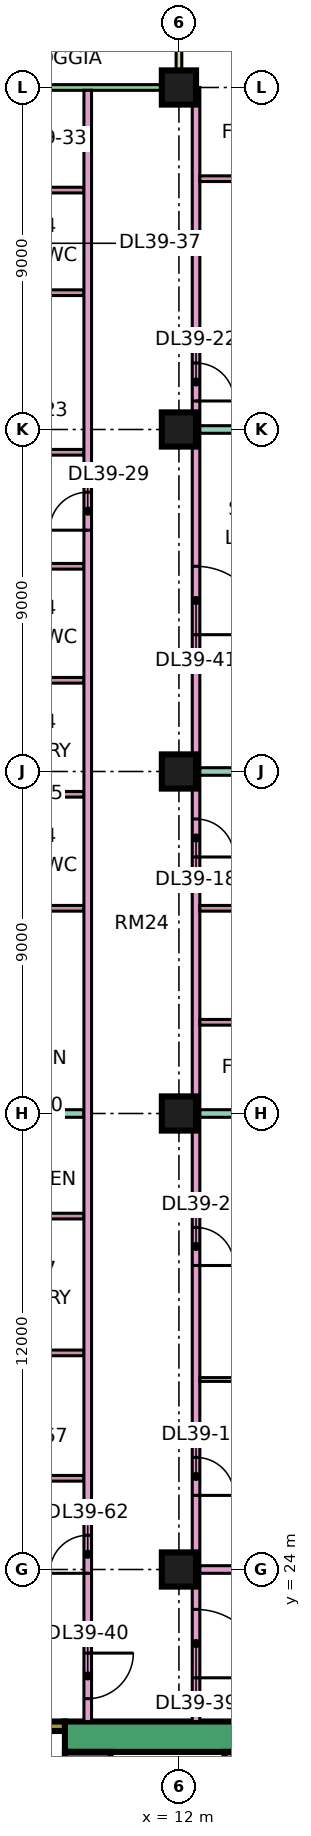
"""IFC4 building model, lengths in metres.
Left out: names, types, materials, properties, quantities, classifications, styles, units other than length and angle.
Written with IfcOpenShell. Run it as: python <this file> out.ifc"""

import sys

from ifc_helpers import new_model, si_unit, direction, frame, frame_2d, origin, origin_2d, place, context, subcontext, project, spatial, rectangle, extrude, element, fill, save


model = new_model("IFC4")
c1 = context("Model", 3, precision=1e-05, world=origin(), true_north=direction((0.0, 1.0)))
c2 = subcontext(c1, "Body", "Model", "MODEL_VIEW")
j1 = project(units=[si_unit("LENGTHUNIT", "METRE"), si_unit("PLANEANGLEUNIT", "RADIAN")], contexts=[c1])
p1 = place(None, origin())
s1 = spatial("IfcSite", under=j1, at=p1, CompositionType="ELEMENT")
p2 = place(p1, origin())
s2 = spatial("IfcBuilding", under=s1, at=p2, CompositionType="ELEMENT")
p3 = place(p2, frame((0.0, 0.0, 172.4)))
s3 = spatial("IfcBuildingStorey", under=s2, at=p3, CompositionType="ELEMENT", Elevation=172.4)
for number, where, z_axis, x_axis in (
    (1, (12.0, 24.0, 0.0), (0.0, 0.0, 1.0), (1.0, 0.0, 0.0)),
    (2, (12.0, 36.0, 0.0), (0.0, 0.0, 1.0), (1.0, 0.0, 0.0)),
    (3, (12.0, 45.0, 0.0), (0.0, 0.0, 1.0), (1.0, 0.0, 0.0)),
    (4, (12.0, 54.0, 0.0), (0.0, 0.0, 1.0), (1.0, 0.0, 0.0)),
    (5, (12.0, 63.0, 0.0), (0.0, 0.0, 1.0), (1.0, 0.0, 0.0)),
):
    element("IfcColumn", number, at=place(p3, frame(where, z_axis=z_axis, x_axis=x_axis)), inside=s3, PredefinedType="COLUMN", context=c2, shape_type="SweptSolid", body=[
        extrude(rectangle(XDim=0.9, YDim=0.9, at=origin_2d()), origin(), (0.0, 0.0, 1.0), 3.75),
    ])
p4 = place(p3, frame((9.0, 19.6, 0.0), z_axis=(0.0, 0.0, 1.0), x_axis=(1.0, 0.0, 0.0)))
e6 = element("IfcWall", 6, at=p4, inside=s3, PredefinedType="SHEAR", context=c2, shape_type="SweptSolid", body=[
    extrude(rectangle(XDim=25.0, YDim=0.8, at=frame_2d((12.5, 0.0))), origin(), (0.0, 0.0, 1.0), 3.75),
])
p5 = place(p4, frame((19.1, 0.0, 0.0)))
e7 = element("IfcOpeningElement", 7, at=p5, cuts=e6, PredefinedType="OPENING", context=c2, shape_type="SweptSolid", body=[
    extrude(rectangle(XDim=1.8, YDim=2.4, at=frame_2d((0.9, 1.2))), frame((0.0, 0.41, 0.0), z_axis=(0.0, -1.0, 0.0), x_axis=(1.0, 0.0, 0.0)), (0.0, 0.0, 1.0), 0.82),
])
p6 = place(p3, frame((9.6, 7.8, 0.0), z_axis=(0.0, 0.0, 1.0), x_axis=(0.0, 1.0, 0.0)))
e8 = element("IfcWall", 8, at=p6, inside=s3, PredefinedType="SHEAR", context=c2, shape_type="SweptSolid", body=[
    extrude(rectangle(XDim=11.4, YDim=1.2, at=frame_2d((5.7, 0.0))), origin(), (0.0, 0.0, 1.0), 3.75),
])
p7 = place(p6, frame((4.075, 0.0, 0.0)))
e9 = element("IfcOpeningElement", 9, at=p7, cuts=e8, PredefinedType="OPENING", context=c2, shape_type="SweptSolid", body=[
    extrude(rectangle(XDim=1.1, YDim=2.2, at=frame_2d((0.55, 1.1))), frame((0.0, 0.61, 0.0), z_axis=(0.0, -1.0, 0.0), x_axis=(1.0, 0.0, 0.0)), (0.0, 0.0, 1.0), 1.22),
])
p8 = place(p6, frame((6.575, 0.0, 0.0)))
e10 = element("IfcOpeningElement", 10, at=p8, cuts=e8, PredefinedType="OPENING", context=c2, shape_type="SweptSolid", body=[
    extrude(rectangle(XDim=1.1, YDim=2.2, at=frame_2d((0.55, 1.1))), frame((0.0, 0.61, 0.0), z_axis=(0.0, -1.0, 0.0), x_axis=(1.0, 0.0, 0.0)), (0.0, 0.0, 1.0), 1.22),
])
p9 = place(p6, frame((9.4, 0.0, 0.0)))
e11 = element("IfcOpeningElement", 11, at=p9, cuts=e8, PredefinedType="OPENING", context=c2, shape_type="SweptSolid", body=[
    extrude(rectangle(XDim=1.1, YDim=2.2, at=frame_2d((0.55, 1.1))), frame((0.0, 0.61, 0.0), z_axis=(0.0, -1.0, 0.0), x_axis=(1.0, 0.0, 0.0)), (0.0, 0.0, 1.0), 1.22),
])
p10 = place(p6, frame((1.75, 0.0, 0.0)))
e12 = element("IfcOpeningElement", 12, at=p10, cuts=e8, PredefinedType="OPENING", context=c2, shape_type="SweptSolid", body=[
    extrude(rectangle(XDim=0.9, YDim=2.1, at=frame_2d((0.45, 1.05))), frame((0.0, 0.61, 0.0), z_axis=(0.0, -1.0, 0.0), x_axis=(1.0, 0.0, 0.0)), (0.0, 0.0, 1.0), 1.22),
])
p11 = place(p3, frame((13.325, 7.8, 0.0), z_axis=(0.0, 0.0, 1.0), x_axis=(0.0, 1.0, 0.0)))
e13 = element("IfcWall", 13, at=p11, inside=s3, PredefinedType="SHEAR", context=c2, shape_type="SweptSolid", body=[
    extrude(rectangle(XDim=11.4, YDim=0.25, at=frame_2d((5.7, 0.0))), origin(), (0.0, 0.0, 1.0), 3.75),
])
p12 = place(p3, frame((2.1, 19.875, 0.0), z_axis=(0.0, 0.0, 1.0), x_axis=(1.0, 0.0, 0.0)))
e14 = element("IfcWall", 14, at=p12, inside=s3, PredefinedType="SHEAR", context=c2, shape_type="SweptSolid", body=[
    extrude(rectangle(XDim=6.9, YDim=0.25, at=frame_2d((3.45, 0.0))), origin(), (0.0, 0.0, 1.0), 3.75),
])
p13 = place(p12, frame((1.175, 0.0, 0.0)))
e15 = element("IfcOpeningElement", 15, at=p13, cuts=e14, PredefinedType="OPENING", context=c2, shape_type="SweptSolid", body=[
    extrude(rectangle(XDim=1.1, YDim=2.2, at=frame_2d((0.55, 1.1))), frame((0.0, 0.135, 0.0), z_axis=(0.0, -1.0, 0.0), x_axis=(1.0, 0.0, 0.0)), (0.0, 0.0, 1.0), 0.27),
])
p14 = place(p12, frame((4.6, 0.0, 0.0)))
e16 = element("IfcOpeningElement", 16, at=p14, cuts=e14, PredefinedType="OPENING", context=c2, shape_type="SweptSolid", body=[
    extrude(rectangle(XDim=1.2, YDim=2.2, at=frame_2d((0.6, 1.1))), frame((0.0, 0.135, 0.0), z_axis=(0.0, -1.0, 0.0), x_axis=(1.0, 0.0, 0.0)), (0.0, 0.0, 1.0), 0.27),
])
p15 = place(p3, frame((11.925, 63.0, 0.0), z_axis=(0.0, 0.0, 1.0), x_axis=(-1.0, 0.0, 0.0)))
e17 = element("IfcWall", 17, at=p15, inside=s3, PredefinedType="SOLIDWALL", context=c2, shape_type="SweptSolid", body=[
    extrude(rectangle(XDim=10.35, YDim=0.15, at=frame_2d((5.175, 0.0))), origin(), (0.0, 0.0, 1.0), 3.35),
])
p16 = place(p15, frame((7.688, 0.0, 0.0)))
e18 = element("IfcOpeningElement", 18, at=p16, cuts=e17, PredefinedType="OPENING", context=c2, shape_type="SweptSolid", body=[
    extrude(rectangle(XDim=1.8, YDim=2.4, at=frame_2d((0.9, 1.2))), frame((0.0, 0.085, 0.0), z_axis=(0.0, -1.0, 0.0), x_axis=(1.0, 0.0, 0.0)), (0.0, 0.0, 1.0), 0.17),
])
p17 = place(p3, frame((12.0, 64.5, 0.0), z_axis=(0.0, 0.0, 1.0), x_axis=(0.0, -1.0, 0.0)))
e19 = element("IfcWall", 19, at=p17, inside=s3, PredefinedType="SOLIDWALL", context=c2, shape_type="SweptSolid", body=[
    extrude(rectangle(XDim=1.5, YDim=0.15, at=frame_2d((0.75, 0.0))), origin(), (0.0, 0.0, 1.0), 3.35),
])
p18 = place(p3, frame((-1.35, 22.4, 0.0), z_axis=(0.0, 0.0, 1.0), x_axis=(1.0, 0.0, 0.0)))
e20 = element("IfcWall", 20, at=p18, inside=s3, PredefinedType="PARTITIONING", context=c2, shape_type="SweptSolid", body=[
    extrude(rectangle(XDim=10.85, YDim=0.2, at=frame_2d((5.425, 0.0))), origin(), (0.0, 0.0, 1.0), 3.35),
])
p19 = place(p3, frame((0.0, 36.0, 0.0), z_axis=(0.0, 0.0, 1.0), x_axis=(1.0, 0.0, 0.0)))
e21 = element("IfcWall", 21, at=p19, inside=s3, PredefinedType="PARTITIONING", context=c2, shape_type="SweptSolid", body=[
    extrude(rectangle(XDim=9.5, YDim=0.2, at=frame_2d((4.75, 0.0))), origin(), (0.0, 0.0, 1.0), 3.35),
])
p20 = place(p3, frame((6.375, 26.4, 0.0), z_axis=(0.0, 0.0, 1.0), x_axis=(1.0, 0.0, 0.0)))
e22 = element("IfcWall", 22, at=p20, inside=s3, PredefinedType="PARTITIONING", context=c2, shape_type="SweptSolid", body=[
    extrude(rectangle(XDim=3.125, YDim=0.15, at=frame_2d((1.562, 0.0))), origin(), (0.0, 0.0, 1.0), 3.35),
])
p21 = place(p20, frame((1.225, 0.0, 0.0)))
e23 = element("IfcOpeningElement", 23, at=p21, cuts=e22, PredefinedType="OPENING", context=c2, shape_type="SweptSolid", body=[
    extrude(rectangle(XDim=0.8, YDim=2.1, at=frame_2d((0.4, 1.05))), frame((0.0, 0.085, 0.0), z_axis=(0.0, -1.0, 0.0), x_axis=(1.0, 0.0, 0.0)), (0.0, 0.0, 1.0), 0.17),
])
for number, where, z_axis, x_axis in (
    (24, (6.375, 29.7, 0.0), (0.0, 0.0, 1.0), (1.0, 0.0, 0.0)),
    (25, (6.375, 33.3, 0.0), (0.0, 0.0, 1.0), (1.0, 0.0, 0.0)),
    (26, (6.375, 41.4, 0.0), (0.0, 0.0, 1.0), (1.0, 0.0, 0.0)),
    (27, (6.375, 44.4, 0.0), (0.0, 0.0, 1.0), (1.0, 0.0, 0.0)),
    (28, (6.375, 47.4, 0.0), (0.0, 0.0, 1.0), (1.0, 0.0, 0.0)),
    (29, (6.375, 50.4, 0.0), (0.0, 0.0, 1.0), (1.0, 0.0, 0.0)),
):
    element("IfcWall", number, at=place(p3, frame(where, z_axis=z_axis, x_axis=x_axis)), inside=s3, PredefinedType="PARTITIONING", context=c2, shape_type="SweptSolid", body=[
        extrude(rectangle(XDim=3.125, YDim=0.15, at=frame_2d((1.562, 0.0))), origin(), (0.0, 0.0, 1.0), 3.35),
    ])
p22 = place(p3, frame((6.375, 53.4, 0.0), z_axis=(0.0, 0.0, 1.0), x_axis=(1.0, 0.0, 0.0)))
e30 = element("IfcWall", 30, at=p22, inside=s3, PredefinedType="PARTITIONING", context=c2, shape_type="SweptSolid", body=[
    extrude(rectangle(XDim=3.125, YDim=0.15, at=frame_2d((1.562, 0.0))), origin(), (0.0, 0.0, 1.0), 3.35),
])
p23 = place(p22, frame((1.225, 0.0, 0.0)))
e31 = element("IfcOpeningElement", 31, at=p23, cuts=e30, PredefinedType="OPENING", context=c2, shape_type="SweptSolid", body=[
    extrude(rectangle(XDim=0.8, YDim=2.1, at=frame_2d((0.4, 1.05))), frame((0.0, 0.085, 0.0), z_axis=(0.0, -1.0, 0.0), x_axis=(1.0, 0.0, 0.0)), (0.0, 0.0, 1.0), 0.17),
])
for number, where, z_axis, x_axis in (
    (32, (6.375, 57.6, 0.0), (0.0, 0.0, 1.0), (1.0, 0.0, 0.0)),
    (33, (6.375, 60.3, 0.0), (0.0, 0.0, 1.0), (1.0, 0.0, 0.0)),
):
    element("IfcWall", number, at=place(p3, frame(where, z_axis=z_axis, x_axis=x_axis)), inside=s3, PredefinedType="PARTITIONING", context=c2, shape_type="SweptSolid", body=[
        extrude(rectangle(XDim=3.125, YDim=0.15, at=frame_2d((1.562, 0.0))), origin(), (0.0, 0.0, 1.0), 3.35),
    ])
p24 = place(p3, frame((9.6, 20.0, 0.0), z_axis=(0.0, 0.0, 1.0), x_axis=(0.0, 1.0, 0.0)))
e34 = element("IfcWall", 34, at=p24, inside=s3, PredefinedType="PARTITIONING", context=c2, shape_type="SweptSolid", body=[
    extrude(rectangle(XDim=42.926, YDim=0.2, at=frame_2d((21.463, 0.0))), origin(), (0.0, 0.0, 1.0), 3.35),
])
p25 = place(p24, frame((31.35, 0.0, 0.0)))
e35 = element("IfcOpeningElement", 35, at=p25, cuts=e34, PredefinedType="OPENING", context=c2, shape_type="SweptSolid", body=[
    extrude(rectangle(XDim=1.0, YDim=2.1, at=frame_2d((0.5, 1.05))), frame((0.0, 0.11, 0.0), z_axis=(0.0, -1.0, 0.0), x_axis=(1.0, 0.0, 0.0)), (0.0, 0.0, 1.0), 0.22),
])
p26 = place(p24, frame((0.6, 0.0, 0.0)))
e36 = element("IfcOpeningElement", 36, at=p26, cuts=e34, PredefinedType="OPENING", context=c2, shape_type="SweptSolid", body=[
    extrude(rectangle(XDim=1.2, YDim=2.1, at=frame_2d((0.6, 1.05))), frame((0.0, 0.11, 0.0), z_axis=(0.0, -1.0, 0.0), x_axis=(1.0, 0.0, 0.0)), (0.0, 0.0, 1.0), 0.22),
])
p27 = place(p24, frame((3.9, 0.0, 0.0)))
e37 = element("IfcOpeningElement", 37, at=p27, cuts=e34, PredefinedType="OPENING", context=c2, shape_type="SweptSolid", body=[
    extrude(rectangle(XDim=1.0, YDim=2.1, at=frame_2d((0.5, 1.05))), frame((0.0, 0.11, 0.0), z_axis=(0.0, -1.0, 0.0), x_axis=(1.0, 0.0, 0.0)), (0.0, 0.0, 1.0), 0.22),
])
p28 = place(p3, frame((12.45, 20.0, 0.0), z_axis=(0.0, 0.0, 1.0), x_axis=(0.0, 1.0, 0.0)))
e38 = element("IfcWall", 38, at=p28, inside=s3, PredefinedType="PARTITIONING", context=c2, shape_type="SweptSolid", body=[
    extrude(rectangle(XDim=43.0, YDim=0.2, at=frame_2d((21.5, 0.0))), origin(), (0.0, 0.0, 1.0), 3.35),
])
p29 = place(p28, frame((5.95, 0.0, 0.0)))
e39 = element("IfcOpeningElement", 39, at=p29, cuts=e38, PredefinedType="OPENING", context=c2, shape_type="SweptSolid", body=[
    extrude(rectangle(XDim=1.0, YDim=2.1, at=frame_2d((0.5, 1.05))), frame((0.0, 0.11, 0.0), z_axis=(0.0, -1.0, 0.0), x_axis=(1.0, 0.0, 0.0)), (0.0, 0.0, 1.0), 0.22),
])
p30 = place(p28, frame((12.0, 0.0, 0.0)))
e40 = element("IfcOpeningElement", 40, at=p30, cuts=e38, PredefinedType="OPENING", context=c2, shape_type="SweptSolid", body=[
    extrude(rectangle(XDim=1.0, YDim=2.1, at=frame_2d((0.5, 1.05))), frame((0.0, 0.11, 0.0), z_axis=(0.0, -1.0, 0.0), x_axis=(1.0, 0.0, 0.0)), (0.0, 0.0, 1.0), 0.22),
])
p31 = place(p28, frame((22.75, 0.0, 0.0)))
e41 = element("IfcOpeningElement", 41, at=p31, cuts=e38, PredefinedType="OPENING", context=c2, shape_type="SweptSolid", body=[
    extrude(rectangle(XDim=1.0, YDim=2.1, at=frame_2d((0.5, 1.05))), frame((0.0, 0.11, 0.0), z_axis=(0.0, -1.0, 0.0), x_axis=(1.0, 0.0, 0.0)), (0.0, 0.0, 1.0), 0.22),
])
p32 = place(p28, frame((34.75, 0.0, 0.0)))
e42 = element("IfcOpeningElement", 42, at=p32, cuts=e38, PredefinedType="OPENING", context=c2, shape_type="SweptSolid", body=[
    extrude(rectangle(XDim=1.0, YDim=2.1, at=frame_2d((0.5, 1.05))), frame((0.0, 0.11, 0.0), z_axis=(0.0, -1.0, 0.0), x_axis=(1.0, 0.0, 0.0)), (0.0, 0.0, 1.0), 0.22),
])
p33 = place(p28, frame((1.15, 0.0, 0.0)))
e43 = element("IfcOpeningElement", 43, at=p33, cuts=e38, PredefinedType="OPENING", context=c2, shape_type="SweptSolid", body=[
    extrude(rectangle(XDim=1.8, YDim=2.1, at=frame_2d((0.9, 1.05))), frame((0.0, 0.11, 0.0), z_axis=(0.0, -1.0, 0.0), x_axis=(1.0, 0.0, 0.0)), (0.0, 0.0, 1.0), 0.22),
])
p34 = place(p28, frame((28.6, 0.0, 0.0)))
e44 = element("IfcOpeningElement", 44, at=p34, cuts=e38, PredefinedType="OPENING", context=c2, shape_type="SweptSolid", body=[
    extrude(rectangle(XDim=1.8, YDim=2.1, at=frame_2d((0.9, 1.05))), frame((0.0, 0.11, 0.0), z_axis=(0.0, -1.0, 0.0), x_axis=(1.0, 0.0, 0.0)), (0.0, 0.0, 1.0), 0.22),
])
p35 = place(p3, frame((12.55, 24.0, 0.0), z_axis=(0.0, 0.0, 1.0), x_axis=(1.0, 0.0, 0.0)))
e45 = element("IfcWall", 45, at=p35, inside=s3, PredefinedType="PARTITIONING", context=c2, shape_type="SweptSolid", body=[
    extrude(rectangle(XDim=8.95, YDim=0.2, at=frame_2d((4.475, 0.0))), origin(), (0.0, 0.0, 1.0), 3.35),
])
p36 = place(p3, frame((12.55, 29.0, 0.0), z_axis=(0.0, 0.0, 1.0), x_axis=(1.0, 0.0, 0.0)))
e46 = element("IfcWall", 46, at=p36, inside=s3, PredefinedType="PARTITIONING", context=c2, shape_type="SweptSolid", body=[
    extrude(rectangle(XDim=8.95, YDim=0.1, at=frame_2d((4.475, 0.0))), origin(), (0.0, 0.0, 1.0), 3.35),
])
p37 = place(p3, frame((12.55, 36.0, 0.0), z_axis=(0.0, 0.0, 1.0), x_axis=(1.0, 0.0, 0.0)))
e47 = element("IfcWall", 47, at=p37, inside=s3, PredefinedType="PARTITIONING", context=c2, shape_type="SweptSolid", body=[
    extrude(rectangle(XDim=11.45, YDim=0.2, at=frame_2d((5.725, 0.0))), origin(), (0.0, 0.0, 1.0), 3.35),
])
p38 = place(p3, frame((12.55, 38.4, 0.0), z_axis=(0.0, 0.0, 1.0), x_axis=(1.0, 0.0, 0.0)))
e48 = element("IfcWall", 48, at=p38, inside=s3, PredefinedType="PARTITIONING", context=c2, shape_type="SweptSolid", body=[
    extrude(rectangle(XDim=5.225, YDim=0.15, at=frame_2d((2.612, 0.0))), origin(), (0.0, 0.0, 1.0), 3.35),
])
p39 = place(p3, frame((12.55, 41.4, 0.0), z_axis=(0.0, 0.0, 1.0), x_axis=(1.0, 0.0, 0.0)))
e49 = element("IfcWall", 49, at=p39, inside=s3, PredefinedType="PARTITIONING", context=c2, shape_type="SweptSolid", body=[
    extrude(rectangle(XDim=5.375, YDim=0.15, at=frame_2d((2.688, 0.0))), origin(), (0.0, 0.0, 1.0), 3.35),
])
p40 = place(p3, frame((12.55, 45.0, 0.0), z_axis=(0.0, 0.0, 1.0), x_axis=(1.0, 0.0, 0.0)))
e50 = element("IfcWall", 50, at=p40, inside=s3, PredefinedType="PARTITIONING", context=c2, shape_type="SweptSolid", body=[
    extrude(rectangle(XDim=11.45, YDim=0.2, at=frame_2d((5.725, 0.0))), origin(), (0.0, 0.0, 1.0), 3.35),
])
p41 = place(p3, frame((12.55, 54.0, 0.0), z_axis=(0.0, 0.0, 1.0), x_axis=(1.0, 0.0, 0.0)))
e51 = element("IfcWall", 51, at=p41, inside=s3, PredefinedType="PARTITIONING", context=c2, shape_type="SweptSolid", body=[
    extrude(rectangle(XDim=11.376, YDim=0.2, at=frame_2d((5.688, 0.0))), origin(), (0.0, 0.0, 1.0), 3.35),
])
for number, where, z_axis, x_axis in (
    (52, (12.55, 56.4, 0.0), (0.0, 0.0, 1.0), (1.0, 0.0, 0.0)),
    (53, (12.55, 60.6, 0.0), (0.0, 0.0, 1.0), (1.0, 0.0, 0.0)),
):
    element("IfcWall", number, at=place(p3, frame(where, z_axis=z_axis, x_axis=x_axis)), inside=s3, PredefinedType="PARTITIONING", context=c2, shape_type="SweptSolid", body=[
        extrude(rectangle(XDim=5.225, YDim=0.15, at=frame_2d((2.612, 0.0))), origin(), (0.0, 0.0, 1.0), 3.35),
    ])
p42 = place(p29, frame((1.0, 0.0, 0.0), z_axis=(0.0, 0.0, 1.0), x_axis=(-1.0, 0.0, 0.0)))
e54 = element("IfcDoor", 54, at=p42, inside=s3, OperationType="SINGLE_SWING_LEFT", PredefinedType="DOOR", context=c2, shape_type="SweptSolid", body=[
    extrude(rectangle(XDim=1.0, YDim=2.1, at=frame_2d((0.5, 1.05))), frame((0.0, 0.025, 0.0), z_axis=(0.0, -1.0, 0.0), x_axis=(1.0, 0.0, 0.0)), (0.0, 0.0, 1.0), 0.05),
])
fill(e39, e54)
p43 = place(p30, frame((1.0, 0.0, 0.0), z_axis=(0.0, 0.0, 1.0), x_axis=(-1.0, 0.0, 0.0)))
e55 = element("IfcDoor", 55, at=p43, inside=s3, OperationType="SINGLE_SWING_LEFT", PredefinedType="DOOR", context=c2, shape_type="SweptSolid", body=[
    extrude(rectangle(XDim=1.0, YDim=2.1, at=frame_2d((0.5, 1.05))), frame((0.0, 0.025, 0.0), z_axis=(0.0, -1.0, 0.0), x_axis=(1.0, 0.0, 0.0)), (0.0, 0.0, 1.0), 0.05),
])
fill(e40, e55)
p44 = place(p31, frame((1.0, 0.0, 0.0), z_axis=(0.0, 0.0, 1.0), x_axis=(-1.0, 0.0, 0.0)))
e56 = element("IfcDoor", 56, at=p44, inside=s3, OperationType="SINGLE_SWING_LEFT", PredefinedType="DOOR", context=c2, shape_type="SweptSolid", body=[
    extrude(rectangle(XDim=1.0, YDim=2.1, at=frame_2d((0.5, 1.05))), frame((0.0, 0.025, 0.0), z_axis=(0.0, -1.0, 0.0), x_axis=(1.0, 0.0, 0.0)), (0.0, 0.0, 1.0), 0.05),
])
fill(e41, e56)
p45 = place(p32, frame((1.0, 0.0, 0.0), z_axis=(0.0, 0.0, 1.0), x_axis=(-1.0, 0.0, 0.0)))
e57 = element("IfcDoor", 57, at=p45, inside=s3, OperationType="SINGLE_SWING_LEFT", PredefinedType="DOOR", context=c2, shape_type="SweptSolid", body=[
    extrude(rectangle(XDim=1.0, YDim=2.1, at=frame_2d((0.5, 1.05))), frame((0.0, 0.025, 0.0), z_axis=(0.0, -1.0, 0.0), x_axis=(1.0, 0.0, 0.0)), (0.0, 0.0, 1.0), 0.05),
])
fill(e42, e57)
p46 = place(p25, origin())
e58 = element("IfcDoor", 58, at=p46, inside=s3, OperationType="SINGLE_SWING_LEFT", PredefinedType="DOOR", context=c2, shape_type="SweptSolid", body=[
    extrude(rectangle(XDim=1.0, YDim=2.1, at=frame_2d((0.5, 1.05))), frame((0.0, 0.025, 0.0), z_axis=(0.0, -1.0, 0.0), x_axis=(1.0, 0.0, 0.0)), (0.0, 0.0, 1.0), 0.05),
])
fill(e35, e58)
p47 = place(p33, frame((1.8, 0.0, 0.0), z_axis=(0.0, 0.0, 1.0), x_axis=(-1.0, 0.0, 0.0)))
e59 = element("IfcDoor", 59, at=p47, inside=s3, OperationType="DOUBLE_DOOR_SINGLE_SWING", PredefinedType="DOOR", context=c2, shape_type="SweptSolid", body=[
    extrude(rectangle(XDim=1.8, YDim=2.1, at=frame_2d((0.9, 1.05))), frame((0.0, 0.025, 0.0), z_axis=(0.0, -1.0, 0.0), x_axis=(1.0, 0.0, 0.0)), (0.0, 0.0, 1.0), 0.05),
])
fill(e43, e59)
p48 = place(p26, origin())
e60 = element("IfcDoor", 60, at=p48, inside=s3, OperationType="SINGLE_SWING_RIGHT", PredefinedType="DOOR", context=c2, shape_type="SweptSolid", body=[
    extrude(rectangle(XDim=1.2, YDim=2.1, at=frame_2d((0.6, 1.05))), frame((0.0, 0.025, 0.0), z_axis=(0.0, -1.0, 0.0), x_axis=(1.0, 0.0, 0.0)), (0.0, 0.0, 1.0), 0.05),
])
fill(e36, e60)
p49 = place(p34, frame((1.8, 0.0, 0.0), z_axis=(0.0, 0.0, 1.0), x_axis=(-1.0, 0.0, 0.0)))
e61 = element("IfcDoor", 61, at=p49, inside=s3, OperationType="DOUBLE_DOOR_SINGLE_SWING", PredefinedType="DOOR", context=c2, shape_type="SweptSolid", body=[
    extrude(rectangle(XDim=1.8, YDim=2.1, at=frame_2d((0.9, 1.05))), frame((0.0, 0.025, 0.0), z_axis=(0.0, -1.0, 0.0), x_axis=(1.0, 0.0, 0.0)), (0.0, 0.0, 1.0), 0.05),
])
fill(e44, e61)
p50 = place(p27, origin())
e62 = element("IfcDoor", 62, at=p50, inside=s3, OperationType="SINGLE_SWING_LEFT", PredefinedType="DOOR", context=c2, shape_type="SweptSolid", body=[
    extrude(rectangle(XDim=1.0, YDim=2.1, at=frame_2d((0.5, 1.05))), frame((0.0, 0.025, 0.0), z_axis=(0.0, -1.0, 0.0), x_axis=(1.0, 0.0, 0.0)), (0.0, 0.0, 1.0), 0.05),
])
fill(e37, e62)
save(model, sys.argv[1])
